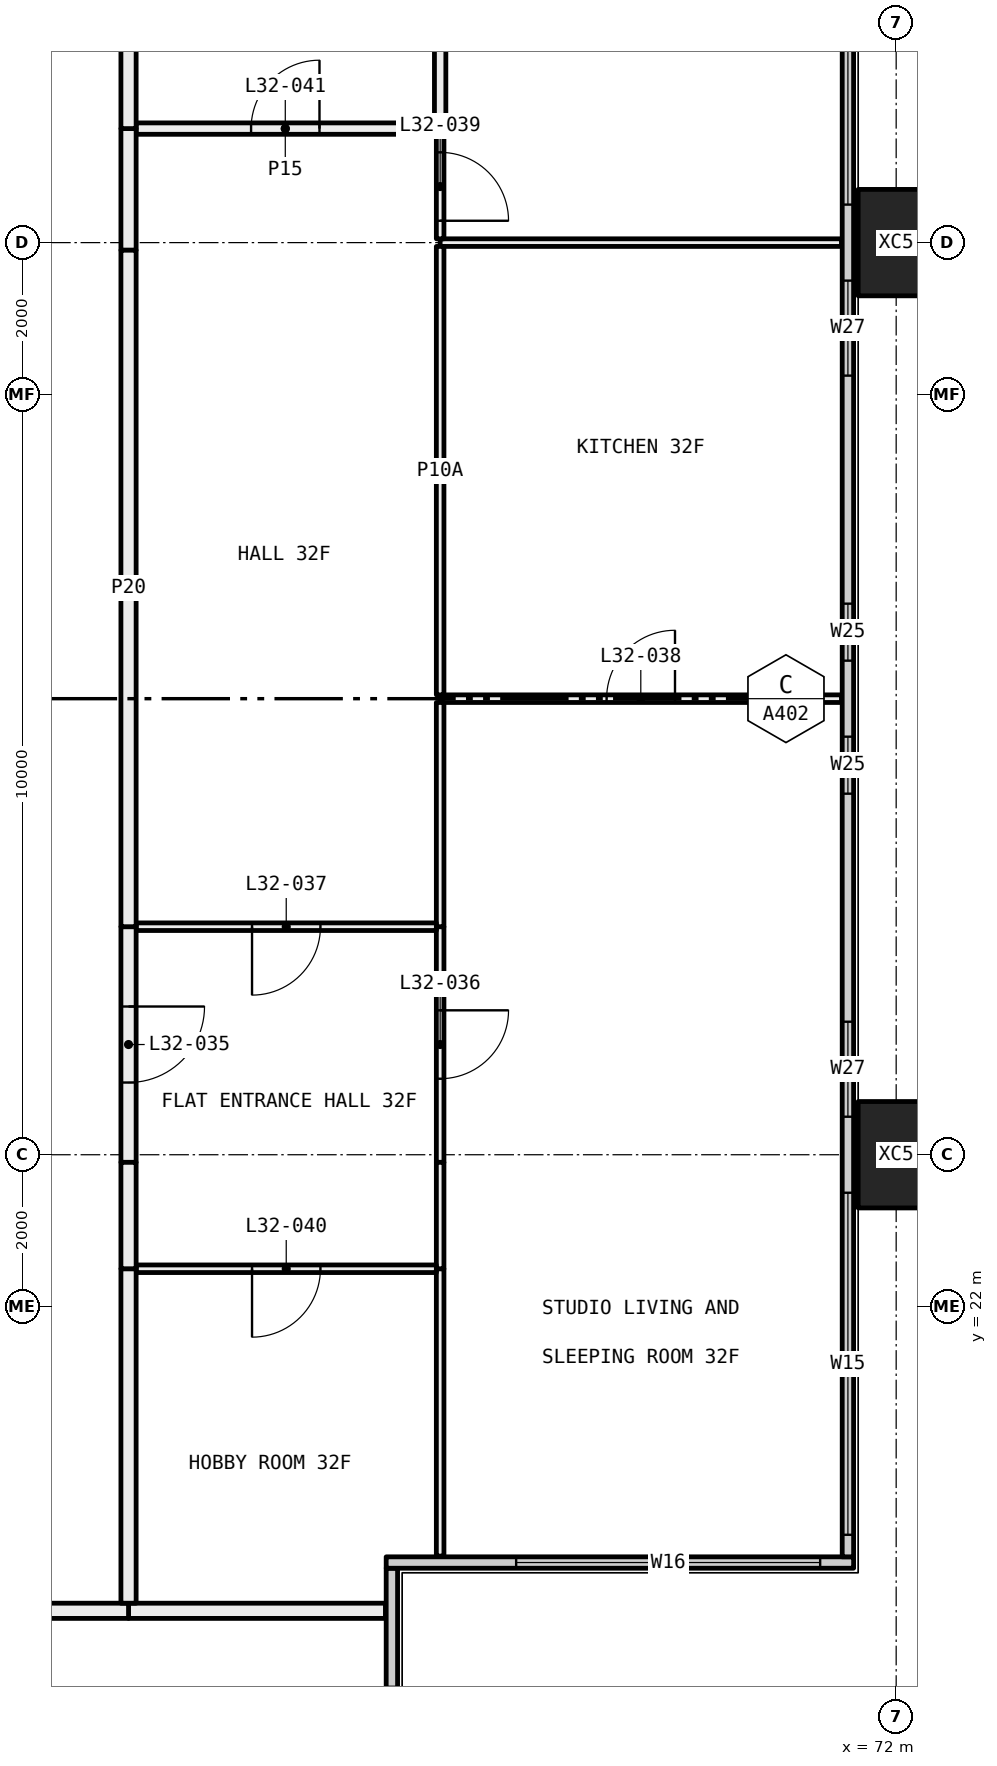
"""IFC4 building model, lengths in metres.
Left out: names, types, materials, properties, quantities, classifications, styles, units other than length and angle.
Written with IfcOpenShell. Run it as: python <this file> out.ifc"""

import sys

from ifc_helpers import new_model, si_unit, direction, frame, frame_2d, origin, origin_2d, place, context, subcontext, project, spatial, rectangle, hollow_rectangle, extrude, element, fill, save


model = new_model("IFC4")
c1 = context("Model", 3, precision=1e-05, world=origin(), true_north=direction((0.0, 1.0)))
c2 = subcontext(c1, "Body", "Model", "MODEL_VIEW")
j1 = project(units=[si_unit("LENGTHUNIT", "METRE"), si_unit("PLANEANGLEUNIT", "RADIAN")], contexts=[c1])
p1 = place(None, origin())
s1 = spatial("IfcSite", under=j1, at=p1, CompositionType="ELEMENT")
p2 = place(p1, origin())
s2 = spatial("IfcBuilding", under=s1, at=p2, CompositionType="ELEMENT")
p3 = place(p2, frame((0.0, 0.0, 124.2)))
s3 = spatial("IfcBuildingStorey", under=s2, at=p3, CompositionType="ELEMENT", Elevation=124.2)
for number, where, z_axis, x_axis in (
    (1, (72.0, 24.0, -0.4), (0.0, 0.0, 1.0), (0.0, 1.0, 0.0)),
    (2, (72.0, 36.0, -0.4), (0.0, 0.0, 1.0), (0.0, 1.0, 0.0)),
):
    element("IfcColumn", number, at=place(p3, frame(where, z_axis=z_axis, x_axis=x_axis)), inside=s3, PredefinedType="COLUMN", context=c2, shape_type="SweptSolid", body=[
        extrude(hollow_rectangle(XDim=1.4, YDim=1.0, WallThickness=0.055, at=origin_2d()), origin(), (0.0, 0.0, 1.0), 3.45),
    ])
p4 = place(p3, frame((65.365, 12.71, 0.0), z_axis=(0.0, 0.0, 1.0), x_axis=(0.0, 1.0, 0.0)))
e3 = element("IfcWall", 3, at=p4, inside=s3, PredefinedType="ELEMENTEDWALL", context=c2, shape_type="SweptSolid", body=[
    extrude(rectangle(XDim=5.85, YDim=0.15, at=frame_2d((2.925, 0.0))), origin(), (0.0, 0.0, 1.0), 3.05),
])
p5 = place(p4, frame((0.29, 0.0, 0.45)))
e4 = element("IfcOpeningElement", 4, at=p5, cuts=e3, PredefinedType="OPENING", context=c2, shape_type="SweptSolid", body=[
    extrude(rectangle(XDim=4.0, YDim=2.55, at=frame_2d((2.0, 1.275))), frame((0.0, 0.085, 0.0), z_axis=(0.0, -1.0, 0.0), x_axis=(1.0, 0.0, 0.0)), (0.0, 0.0, 1.0), 0.17),
])
p6 = place(p3, frame((65.29, 18.635, 0.0), z_axis=(0.0, 0.0, 1.0), x_axis=(1.0, 0.0, 0.0)))
e5 = element("IfcWall", 5, at=p6, inside=s3, PredefinedType="ELEMENTEDWALL", context=c2, shape_type="SweptSolid", body=[
    extrude(rectangle(XDim=6.15, YDim=0.15, at=frame_2d((3.075, 0.0))), origin(), (0.0, 0.0, 1.0), 3.05),
])
p7 = place(p6, frame((1.71, 0.0, 0.45)))
e6 = element("IfcOpeningElement", 6, at=p7, cuts=e5, PredefinedType="OPENING", context=c2, shape_type="SweptSolid", body=[
    extrude(rectangle(XDim=4.0, YDim=2.55, at=frame_2d((2.0, 1.275))), frame((0.0, 0.085, 0.0), z_axis=(0.0, -1.0, 0.0), x_axis=(1.0, 0.0, 0.0)), (0.0, 0.0, 1.0), 0.17),
])
p8 = place(p3, frame((71.365, 18.71, 0.0), z_axis=(0.0, 0.0, 1.0), x_axis=(0.0, 1.0, 0.0)))
e7 = element("IfcWall", 7, at=p8, inside=s3, PredefinedType="ELEMENTEDWALL", context=c2, shape_type="SweptSolid", body=[
    extrude(rectangle(XDim=22.58, YDim=0.15, at=frame_2d((11.29, 0.0))), origin(), (0.0, 0.0, 1.0), 3.05),
])
p9 = place(p8, frame((0.29, 0.0, 0.45)))
e8 = element("IfcOpeningElement", 8, at=p9, cuts=e7, PredefinedType="OPENING", context=c2, shape_type="SweptSolid", body=[
    extrude(rectangle(XDim=4.5, YDim=2.55, at=frame_2d((2.25, 1.275))), frame((0.0, 0.085, 0.0), z_axis=(0.0, -1.0, 0.0), x_axis=(1.0, 0.0, 0.0)), (0.0, 0.0, 1.0), 0.17),
])
p10 = place(p8, frame((5.79, 0.0, 0.45)))
e9 = element("IfcOpeningElement", 9, at=p10, cuts=e7, PredefinedType="OPENING", context=c2, shape_type="SweptSolid", body=[
    extrude(rectangle(XDim=1.25, YDim=2.55, at=frame_2d((0.625, 1.275))), frame((0.0, 0.085, 0.0), z_axis=(0.0, -1.0, 0.0), x_axis=(1.0, 0.0, 0.0)), (0.0, 0.0, 1.0), 0.17),
])
p11 = place(p8, frame((10.04, 0.0, 0.45)))
e10 = element("IfcOpeningElement", 10, at=p11, cuts=e7, PredefinedType="OPENING", context=c2, shape_type="SweptSolid", body=[
    extrude(rectangle(XDim=0.75, YDim=2.55, at=frame_2d((0.375, 1.275))), frame((0.0, 0.085, 0.0), z_axis=(0.0, -1.0, 0.0), x_axis=(1.0, 0.0, 0.0)), (0.0, 0.0, 1.0), 0.17),
])
p12 = place(p8, frame((11.79, 0.0, 0.45)))
e11 = element("IfcOpeningElement", 11, at=p12, cuts=e7, PredefinedType="OPENING", context=c2, shape_type="SweptSolid", body=[
    extrude(rectangle(XDim=0.75, YDim=2.55, at=frame_2d((0.375, 1.275))), frame((0.0, 0.085, 0.0), z_axis=(0.0, -1.0, 0.0), x_axis=(1.0, 0.0, 0.0)), (0.0, 0.0, 1.0), 0.17),
])
p13 = place(p8, frame((15.54, 0.0, 0.45)))
e12 = element("IfcOpeningElement", 12, at=p13, cuts=e7, PredefinedType="OPENING", context=c2, shape_type="SweptSolid", body=[
    extrude(rectangle(XDim=1.25, YDim=2.55, at=frame_2d((0.625, 1.275))), frame((0.0, 0.085, 0.0), z_axis=(0.0, -1.0, 0.0), x_axis=(1.0, 0.0, 0.0)), (0.0, 0.0, 1.0), 0.17),
])
p14 = place(p8, frame((17.79, 0.0, 0.45)))
e13 = element("IfcOpeningElement", 13, at=p14, cuts=e7, PredefinedType="OPENING", context=c2, shape_type="SweptSolid", body=[
    extrude(rectangle(XDim=4.5, YDim=2.55, at=frame_2d((2.25, 1.275))), frame((0.0, 0.085, 0.0), z_axis=(0.0, -1.0, 0.0), x_axis=(1.0, 0.0, 0.0)), (0.0, 0.0, 1.0), 0.17),
])
p15 = place(p3, frame((65.28, 18.0, 0.0), z_axis=(0.0, 0.0, 1.0), x_axis=(-1.0, 0.0, 0.0)))
e14 = element("IfcWall", 14, at=p15, inside=s3, PredefinedType="PARTITIONING", context=c2, shape_type="SweptSolid", body=[
    extrude(rectangle(XDim=3.38, YDim=0.2, at=frame_2d((1.69, 0.0))), origin(), (0.0, 0.0, 1.0), 3.05),
])
p16 = place(p3, frame((61.9, 18.0, 0.0), z_axis=(0.0, 0.0, 1.0), x_axis=(-1.0, 0.0, 0.0)))
e15 = element("IfcWall", 15, at=p16, inside=s3, PredefinedType="PARTITIONING", context=c2, shape_type="SweptSolid", body=[
    extrude(rectangle(XDim=7.9, YDim=0.2, at=frame_2d((3.95, 0.0))), origin(), (0.0, 0.0, 1.0), 3.05),
])
p17 = place(p3, frame((71.28, 30.0, 0.0), z_axis=(0.0, 0.0, 1.0), x_axis=(-1.0, 0.0, 0.0)))
e16 = element("IfcWall", 16, at=p17, inside=s3, PredefinedType="PARTITIONING", context=c2, shape_type="SweptSolid", body=[
    extrude(rectangle(XDim=5.28, YDim=0.1, at=frame_2d((2.64, 0.0))), origin(), (0.0, 0.0, 1.0), 3.05),
])
p18 = place(p17, frame((2.19, 0.0, 0.0)))
e17 = element("IfcOpeningElement", 17, at=p18, cuts=e16, PredefinedType="OPENING", context=c2, shape_type="SweptSolid", body=[
    extrude(rectangle(XDim=0.9, YDim=2.1, at=frame_2d((0.45, 1.05))), frame((0.0, 0.06, 0.0), z_axis=(0.0, -1.0, 0.0), x_axis=(1.0, 0.0, 0.0)), (0.0, 0.0, 1.0), 0.12),
])
p19 = place(p3, frame((66.0, 22.5, 0.0), z_axis=(0.0, 0.0, 1.0), x_axis=(0.0, -1.0, 0.0)))
e18 = element("IfcWall", 18, at=p19, inside=s3, PredefinedType="PARTITIONING", context=c2, shape_type="SweptSolid", body=[
    extrude(rectangle(XDim=3.78, YDim=0.1, at=frame_2d((1.89, 0.0))), origin(), (0.0, 0.0, 1.0), 3.05),
])
p20 = place(p3, frame((66.0, 27.0, 0.0), z_axis=(0.0, 0.0, 1.0), x_axis=(0.0, -1.0, 0.0)))
e19 = element("IfcWall", 19, at=p20, inside=s3, PredefinedType="PARTITIONING", context=c2, shape_type="SweptSolid", body=[
    extrude(rectangle(XDim=3.1, YDim=0.1, at=frame_2d((1.55, 0.0))), origin(), (0.0, 0.0, 1.0), 2.45),
])
p21 = place(p20, frame((1.1, 0.0, 0.0)))
e20 = element("IfcOpeningElement", 20, at=p21, cuts=e19, PredefinedType="OPENING", context=c2, shape_type="SweptSolid", body=[
    extrude(rectangle(XDim=0.9, YDim=2.1, at=frame_2d((0.45, 1.05))), frame((0.0, 0.06, 0.0), z_axis=(0.0, -1.0, 0.0), x_axis=(1.0, 0.0, 0.0)), (0.0, 0.0, 1.0), 0.12),
])
p22 = place(p3, frame((66.0, 23.9, 0.0), z_axis=(0.0, 0.0, 1.0), x_axis=(0.0, -1.0, 0.0)))
e21 = element("IfcWall", 21, at=p22, inside=s3, PredefinedType="PARTITIONING", context=c2, shape_type="SweptSolid", body=[
    extrude(rectangle(XDim=1.4, YDim=0.1, at=frame_2d((0.7, 0.0))), origin(), (0.0, 0.0, 1.0), 3.05),
])
p23 = place(p3, frame((66.0, 29.95, 0.0), z_axis=(0.0, 0.0, 1.0), x_axis=(0.0, -1.0, 0.0)))
e22 = element("IfcWall", 22, at=p23, inside=s3, PredefinedType="PARTITIONING", context=c2, shape_type="SweptSolid", body=[
    extrude(rectangle(XDim=2.95, YDim=0.1, at=frame_2d((1.475, 0.0))), origin(), (0.0, 0.0, 1.0), 3.05),
])
p24 = place(p3, frame((71.28, 36.0, 0.0), z_axis=(0.0, 0.0, 1.0), x_axis=(-1.0, 0.0, 0.0)))
e23 = element("IfcWall", 23, at=p24, inside=s3, PredefinedType="PARTITIONING", context=c2, shape_type="SweptSolid", body=[
    extrude(rectangle(XDim=5.28, YDim=0.1, at=frame_2d((2.64, 0.0))), origin(), (0.0, 0.0, 1.0), 2.45),
])
p25 = place(p3, frame((66.0, 35.95, 0.0), z_axis=(0.0, 0.0, 1.0), x_axis=(0.0, -1.0, 0.0)))
e24 = element("IfcWall", 24, at=p25, inside=s3, PredefinedType="PARTITIONING", context=c2, shape_type="SweptSolid", body=[
    extrude(rectangle(XDim=5.9, YDim=0.1, at=frame_2d((2.95, 0.0))), origin(), (0.0, 0.0, 1.0), 2.45),
])
p26 = place(p3, frame((66.0, 37.425, 0.0), z_axis=(0.0, 0.0, 1.0), x_axis=(0.0, -1.0, 0.0)))
e25 = element("IfcWall", 25, at=p26, inside=s3, PredefinedType="PARTITIONING", context=c2, shape_type="SweptSolid", body=[
    extrude(rectangle(XDim=1.375, YDim=0.1, at=frame_2d((0.688, 0.0))), origin(), (0.0, 0.0, 1.0), 2.45),
])
p27 = place(p26, frame((0.238, 0.0, 0.0)))
e26 = element("IfcOpeningElement", 26, at=p27, cuts=e25, PredefinedType="OPENING", context=c2, shape_type="SweptSolid", body=[
    extrude(rectangle(XDim=0.9, YDim=2.1, at=frame_2d((0.45, 1.05))), frame((0.0, 0.06, 0.0), z_axis=(0.0, -1.0, 0.0), x_axis=(1.0, 0.0, 0.0)), (0.0, 0.0, 1.0), 0.12),
])
p28 = place(p3, frame((66.0, 41.28, 0.0), z_axis=(0.0, 0.0, 1.0), x_axis=(0.0, -1.0, 0.0)))
e27 = element("IfcWall", 27, at=p28, inside=s3, PredefinedType="PARTITIONING", context=c2, shape_type="SweptSolid", body=[
    extrude(rectangle(XDim=3.78, YDim=0.15, at=frame_2d((1.89, 0.0))), origin(), (0.0, 0.0, 1.0), 3.05),
])
p29 = place(p3, frame((65.95, 22.5, 0.0), z_axis=(0.0, 0.0, 1.0), x_axis=(-1.0, 0.0, 0.0)))
e28 = element("IfcWall", 28, at=p29, inside=s3, PredefinedType="PARTITIONING", context=c2, shape_type="SweptSolid", body=[
    extrude(rectangle(XDim=3.95, YDim=0.1, at=frame_2d((1.975, 0.0))), origin(), (0.0, 0.0, 1.0), 3.05),
])
p30 = place(p29, frame((1.525, 0.0, 0.0)))
e29 = element("IfcOpeningElement", 29, at=p30, cuts=e28, PredefinedType="OPENING", context=c2, shape_type="SweptSolid", body=[
    extrude(rectangle(XDim=0.9, YDim=2.1, at=frame_2d((0.45, 1.05))), frame((0.0, 0.06, 0.0), z_axis=(0.0, -1.0, 0.0), x_axis=(1.0, 0.0, 0.0)), (0.0, 0.0, 1.0), 0.12),
])
p31 = place(p3, frame((61.9, 22.5, 0.0), z_axis=(0.0, 0.0, 1.0), x_axis=(0.0, -1.0, 0.0)))
e30 = element("IfcWall", 30, at=p31, inside=s3, PredefinedType="PARTITIONING", context=c2, shape_type="SweptSolid", body=[
    extrude(rectangle(XDim=4.4, YDim=0.2, at=frame_2d((2.2, 0.0))), origin(), (0.0, 0.0, 1.0), 3.05),
])
p32 = place(p3, frame((65.95, 27.0, 0.0), z_axis=(0.0, 0.0, 1.0), x_axis=(-1.0, 0.0, 0.0)))
e31 = element("IfcWall", 31, at=p32, inside=s3, PredefinedType="PARTITIONING", context=c2, shape_type="SweptSolid", body=[
    extrude(rectangle(XDim=3.95, YDim=0.1, at=frame_2d((1.975, 0.0))), origin(), (0.0, 0.0, 1.0), 3.05),
])
p33 = place(p32, frame((1.525, 0.0, 0.0)))
e32 = element("IfcOpeningElement", 32, at=p33, cuts=e31, PredefinedType="OPENING", context=c2, shape_type="SweptSolid", body=[
    extrude(rectangle(XDim=0.9, YDim=2.1, at=frame_2d((0.45, 1.05))), frame((0.0, 0.06, 0.0), z_axis=(0.0, -1.0, 0.0), x_axis=(1.0, 0.0, 0.0)), (0.0, 0.0, 1.0), 0.12),
])
p34 = place(p3, frame((61.9, 27.0, 0.0), z_axis=(0.0, 0.0, 1.0), x_axis=(0.0, -1.0, 0.0)))
e33 = element("IfcWall", 33, at=p34, inside=s3, PredefinedType="PARTITIONING", context=c2, shape_type="SweptSolid", body=[
    extrude(rectangle(XDim=3.1, YDim=0.2, at=frame_2d((1.55, 0.0))), origin(), (0.0, 0.0, 1.0), 2.45),
])
p35 = place(p34, frame((1.05, 0.0, 0.0)))
e34 = element("IfcOpeningElement", 34, at=p35, cuts=e33, PredefinedType="OPENING", context=c2, shape_type="SweptSolid", body=[
    extrude(rectangle(XDim=1.0, YDim=2.1, at=frame_2d((0.5, 1.05))), frame((0.0, 0.11, 0.0), z_axis=(0.0, -1.0, 0.0), x_axis=(1.0, 0.0, 0.0)), (0.0, 0.0, 1.0), 0.22),
])
p36 = place(p3, frame((61.9, 23.9, 0.0), z_axis=(0.0, 0.0, 1.0), x_axis=(0.0, -1.0, 0.0)))
e35 = element("IfcWall", 35, at=p36, inside=s3, PredefinedType="PARTITIONING", context=c2, shape_type="SweptSolid", body=[
    extrude(rectangle(XDim=1.4, YDim=0.2, at=frame_2d((0.7, 0.0))), origin(), (0.0, 0.0, 1.0), 3.05),
])
p37 = place(p3, frame((65.925, 37.5, 0.0), z_axis=(0.0, 0.0, 1.0), x_axis=(-1.0, 0.0, 0.0)))
e36 = element("IfcWall", 36, at=p37, inside=s3, PredefinedType="PARTITIONING", context=c2, shape_type="SweptSolid", body=[
    extrude(rectangle(XDim=3.925, YDim=0.15, at=frame_2d((1.962, 0.0))), origin(), (0.0, 0.0, 1.0), 3.05),
])
p38 = place(p37, frame((1.512, 0.0, 0.0)))
e37 = element("IfcOpeningElement", 37, at=p38, cuts=e36, PredefinedType="OPENING", context=c2, shape_type="SweptSolid", body=[
    extrude(rectangle(XDim=0.9, YDim=2.1, at=frame_2d((0.45, 1.05))), frame((0.0, 0.085, 0.0), z_axis=(0.0, -1.0, 0.0), x_axis=(1.0, 0.0, 0.0)), (0.0, 0.0, 1.0), 0.17),
])
p39 = place(p3, frame((61.9, 37.5, 0.0), z_axis=(0.0, 0.0, 1.0), x_axis=(0.0, -1.0, 0.0)))
e38 = element("IfcWall", 38, at=p39, inside=s3, PredefinedType="PARTITIONING", context=c2, shape_type="SweptSolid", body=[
    extrude(rectangle(XDim=1.6, YDim=0.2, at=frame_2d((0.8, 0.0))), origin(), (0.0, 0.0, 1.0), 2.45),
])
p40 = place(p3, frame((61.9, 35.9, 0.0), z_axis=(0.0, 0.0, 1.0), x_axis=(0.0, -1.0, 0.0)))
e39 = element("IfcWall", 39, at=p40, inside=s3, PredefinedType="PARTITIONING", context=c2, shape_type="SweptSolid", body=[
    extrude(rectangle(XDim=8.9, YDim=0.2, at=frame_2d((4.45, 0.0))), origin(), (0.0, 0.0, 1.0), 3.05),
])
p41 = place(p3, frame((61.9, 41.9, 0.0), z_axis=(0.0, 0.0, 1.0), x_axis=(0.0, -1.0, 0.0)))
e40 = element("IfcWall", 40, at=p41, inside=s3, PredefinedType="PARTITIONING", context=c2, shape_type="SweptSolid", body=[
    extrude(rectangle(XDim=4.4, YDim=0.2, at=frame_2d((2.2, 0.0))), origin(), (0.0, 0.0, 1.0), 3.05),
])
p42 = place(p7, origin())
e41 = element("IfcWindow", 41, at=p42, inside=s3, PartitioningType="SINGLE_PANEL", PredefinedType="WINDOW", context=c2, shape_type="SweptSolid", body=[
    extrude(rectangle(XDim=4.0, YDim=2.55, at=frame_2d((2.0, 1.275))), frame((0.0, 0.03, 0.0), z_axis=(0.0, -1.0, 0.0), x_axis=(1.0, 0.0, 0.0)), (0.0, 0.0, 1.0), 0.06),
])
fill(e6, e41)
p43 = place(p9, origin())
e42 = element("IfcWindow", 42, at=p43, inside=s3, PartitioningType="SINGLE_PANEL", PredefinedType="WINDOW", context=c2, shape_type="SweptSolid", body=[
    extrude(rectangle(XDim=4.5, YDim=2.55, at=frame_2d((2.25, 1.275))), frame((0.0, 0.03, 0.0), z_axis=(0.0, -1.0, 0.0), x_axis=(1.0, 0.0, 0.0)), (0.0, 0.0, 1.0), 0.06),
])
fill(e8, e42)
p44 = place(p10, origin())
e43 = element("IfcWindow", 43, at=p44, inside=s3, PartitioningType="SINGLE_PANEL", PredefinedType="WINDOW", context=c2, shape_type="SweptSolid", body=[
    extrude(rectangle(XDim=1.25, YDim=2.55, at=frame_2d((0.625, 1.275))), frame((0.0, 0.03, 0.0), z_axis=(0.0, -1.0, 0.0), x_axis=(1.0, 0.0, 0.0)), (0.0, 0.0, 1.0), 0.06),
])
fill(e9, e43)
p45 = place(p11, origin())
e44 = element("IfcWindow", 44, at=p45, inside=s3, PartitioningType="SINGLE_PANEL", PredefinedType="WINDOW", context=c2, shape_type="SweptSolid", body=[
    extrude(rectangle(XDim=0.75, YDim=2.55, at=frame_2d((0.375, 1.275))), frame((0.0, 0.03, 0.0), z_axis=(0.0, -1.0, 0.0), x_axis=(1.0, 0.0, 0.0)), (0.0, 0.0, 1.0), 0.06),
])
fill(e10, e44)
p46 = place(p12, origin())
e45 = element("IfcWindow", 45, at=p46, inside=s3, PartitioningType="SINGLE_PANEL", PredefinedType="WINDOW", context=c2, shape_type="SweptSolid", body=[
    extrude(rectangle(XDim=0.75, YDim=2.55, at=frame_2d((0.375, 1.275))), frame((0.0, 0.03, 0.0), z_axis=(0.0, -1.0, 0.0), x_axis=(1.0, 0.0, 0.0)), (0.0, 0.0, 1.0), 0.06),
])
fill(e11, e45)
p47 = place(p13, origin())
e46 = element("IfcWindow", 46, at=p47, inside=s3, PartitioningType="SINGLE_PANEL", PredefinedType="WINDOW", context=c2, shape_type="SweptSolid", body=[
    extrude(rectangle(XDim=1.25, YDim=2.55, at=frame_2d((0.625, 1.275))), frame((0.0, 0.03, 0.0), z_axis=(0.0, -1.0, 0.0), x_axis=(1.0, 0.0, 0.0)), (0.0, 0.0, 1.0), 0.06),
])
fill(e12, e46)
p48 = place(p14, origin())
e47 = element("IfcWindow", 47, at=p48, inside=s3, PartitioningType="SINGLE_PANEL", PredefinedType="WINDOW", context=c2, shape_type="SweptSolid", body=[
    extrude(rectangle(XDim=4.5, YDim=2.55, at=frame_2d((2.25, 1.275))), frame((0.0, 0.03, 0.0), z_axis=(0.0, -1.0, 0.0), x_axis=(1.0, 0.0, 0.0)), (0.0, 0.0, 1.0), 0.06),
])
fill(e13, e47)
p49 = place(p35, origin())
e48 = element("IfcDoor", 48, at=p49, inside=s3, OperationType="SINGLE_SWING_RIGHT", PredefinedType="DOOR", context=c2, shape_type="SweptSolid", body=[
    extrude(rectangle(XDim=1.0, YDim=2.1, at=frame_2d((0.5, 1.05))), frame((0.0, 0.025, 0.0), z_axis=(0.0, -1.0, 0.0), x_axis=(1.0, 0.0, 0.0)), (0.0, 0.0, 1.0), 0.05),
])
fill(e34, e48)
p50 = place(p21, origin())
e49 = element("IfcDoor", 49, at=p50, inside=s3, OperationType="SINGLE_SWING_RIGHT", PredefinedType="DOOR", context=c2, shape_type="SweptSolid", body=[
    extrude(rectangle(XDim=0.9, YDim=2.1, at=frame_2d((0.45, 1.05))), frame((0.0, 0.025, 0.0), z_axis=(0.0, -1.0, 0.0), x_axis=(1.0, 0.0, 0.0)), (0.0, 0.0, 1.0), 0.05),
])
fill(e20, e49)
p51 = place(p33, origin())
e50 = element("IfcDoor", 50, at=p51, inside=s3, OperationType="SINGLE_SWING_LEFT", PredefinedType="DOOR", context=c2, shape_type="SweptSolid", body=[
    extrude(rectangle(XDim=0.9, YDim=2.1, at=frame_2d((0.45, 1.05))), frame((0.0, 0.025, 0.0), z_axis=(0.0, -1.0, 0.0), x_axis=(1.0, 0.0, 0.0)), (0.0, 0.0, 1.0), 0.05),
])
fill(e32, e50)
p52 = place(p18, frame((0.9, 0.0, 0.0), x_axis=(-1.0, 0.0, 0.0)))
e51 = element("IfcDoor", 51, at=p52, inside=s3, OperationType="SINGLE_SWING_LEFT", PredefinedType="DOOR", context=c2, shape_type="SweptSolid", body=[
    extrude(rectangle(XDim=0.9, YDim=2.1, at=frame_2d((0.45, 1.05))), frame((0.0, 0.025, 0.0), z_axis=(0.0, -1.0, 0.0), x_axis=(1.0, 0.0, 0.0)), (0.0, 0.0, 1.0), 0.05),
])
fill(e17, e51)
p53 = place(p27, origin())
e52 = element("IfcDoor", 52, at=p53, inside=s3, OperationType="SINGLE_SWING_LEFT", PredefinedType="DOOR", context=c2, shape_type="SweptSolid", body=[
    extrude(rectangle(XDim=0.9, YDim=2.1, at=frame_2d((0.45, 1.05))), frame((0.0, 0.025, 0.0), z_axis=(0.0, -1.0, 0.0), x_axis=(1.0, 0.0, 0.0)), (0.0, 0.0, 1.0), 0.05),
])
fill(e26, e52)
p54 = place(p30, origin())
e53 = element("IfcDoor", 53, at=p54, inside=s3, OperationType="SINGLE_SWING_LEFT", PredefinedType="DOOR", context=c2, shape_type="SweptSolid", body=[
    extrude(rectangle(XDim=0.9, YDim=2.1, at=frame_2d((0.45, 1.05))), frame((0.0, 0.025, 0.0), z_axis=(0.0, -1.0, 0.0), x_axis=(1.0, 0.0, 0.0)), (0.0, 0.0, 1.0), 0.05),
])
fill(e29, e53)
p55 = place(p38, frame((0.9, 0.0, 0.0), x_axis=(-1.0, 0.0, 0.0)))
e54 = element("IfcDoor", 54, at=p55, inside=s3, OperationType="SINGLE_SWING_LEFT", PredefinedType="DOOR", context=c2, shape_type="SweptSolid", body=[
    extrude(rectangle(XDim=0.9, YDim=2.1, at=frame_2d((0.45, 1.05))), frame((0.0, 0.025, 0.0), z_axis=(0.0, -1.0, 0.0), x_axis=(1.0, 0.0, 0.0)), (0.0, 0.0, 1.0), 0.05),
])
fill(e37, e54)
save(model, sys.argv[1])
